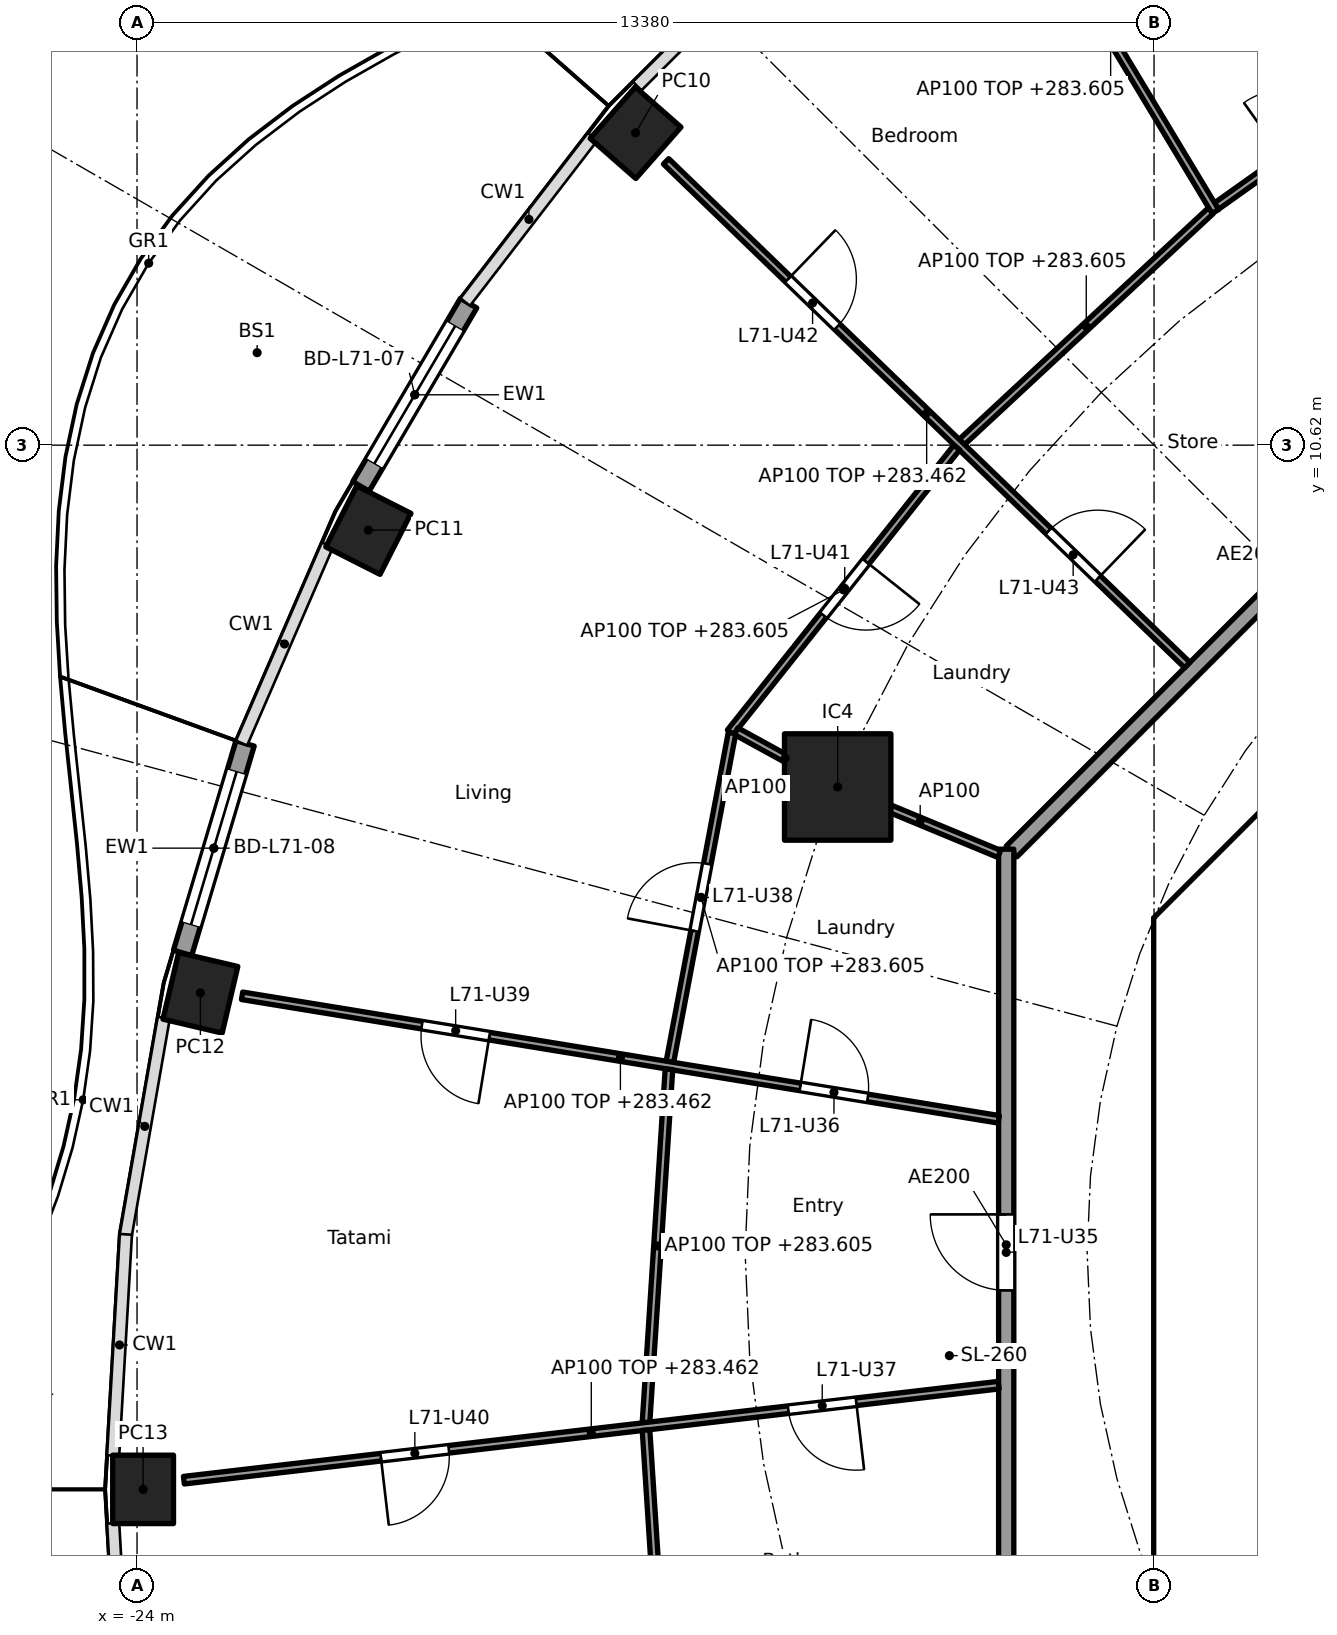
"""IFC4 building model, lengths in metres.
Left out: names, types, materials, properties, quantities, classifications, styles, units other than length and angle.
Written with IfcOpenShell. Run it as: python <this file> out.ifc"""

import sys

from ifc_helpers import new_model, si_unit, direction, frame, frame_2d, origin, origin_2d, place, context, subcontext, project, spatial, polyline, rectangle, hollow_rectangle, outline, extrude, element, fill, save


model = new_model("IFC4")
c1 = context("Model", 3, precision=1e-05, world=origin(), true_north=direction((0.0, 1.0)))
c2 = subcontext(c1, "Body", "Model", "MODEL_VIEW")
j1 = project(units=[si_unit("LENGTHUNIT", "METRE"), si_unit("PLANEANGLEUNIT", "RADIAN")], contexts=[c1])
p1 = place(None, origin())
s1 = spatial("IfcSite", under=j1, at=p1, CompositionType="ELEMENT")
p2 = place(p1, origin())
s2 = spatial("IfcBuilding", under=s1, at=p2, CompositionType="ELEMENT")
p3 = place(p2, frame((0.0, 0.0, 280.7)))
s3 = spatial("IfcBuildingStorey", under=s2, at=p3, CompositionType="ELEMENT", Elevation=280.7)
for number, where, z_axis, x_axis in (
    (1, (-17.441, 14.73, 0.0), (0.0, 0.0, 1.0), (-0.66, -0.751, 0.0)),
    (2, (-20.957, 9.502, 0.0), (0.0, 0.0, 1.0), (-0.452, -0.892, 0.0)),
    (3, (-23.166, 3.415, 0.0), (0.0, 0.0, 1.0), (-0.229, -0.973, 0.0)),
    (4, (-23.92, -3.118, 0.0), (0.0, 0.0, 1.0), (0.0, -1.0, 0.0)),
):
    element("IfcColumn", number, at=place(p3, frame(where, z_axis=z_axis, x_axis=x_axis)), inside=s3, PredefinedType="COLUMN", context=c2, shape_type="SweptSolid", body=[
        extrude(hollow_rectangle(XDim=0.9, YDim=0.8, WallThickness=0.028, at=origin_2d()), origin(), (0.0, 0.0, 1.0), 3.7),
    ])
p4 = place(p3, frame((-14.782, 6.123, 0.0), z_axis=(0.0, 0.0, 1.0), x_axis=(1.0, 0.0, 0.0)))
e5 = element("IfcColumn", 5, at=p4, inside=s3, PredefinedType="COLUMN", context=c2, shape_type="SweptSolid", body=[
    extrude(rectangle(XDim=1.4, YDim=1.4, at=origin_2d()), origin(), (0.0, 0.0, 1.0), 3.7),
])
p5 = place(p3, frame((-21.054, 10.077, 0.0), z_axis=(0.0, 0.0, 1.0), x_axis=(0.506371364425, 0.862315511452, 0.0)))
e6 = element("IfcWall", 6, at=p5, inside=s3, PredefinedType="SOLIDWALL", context=c2, shape_type="SweptSolid", body=[
    extrude(rectangle(XDim=2.796, YDim=0.25, at=frame_2d((1.398, 0.0))), origin(), (0.0, 0.0, 1.0), 3.44),
])
p6 = place(p5, frame((0.348, 0.0, 0.0)))
e7 = element("IfcOpeningElement", 7, at=p6, cuts=e6, PredefinedType="OPENING", context=c2, shape_type="SweptSolid", body=[
    extrude(rectangle(XDim=2.1, YDim=2.4, at=frame_2d((1.05, 1.2))), frame((0.0, 0.135, 0.0), z_axis=(0.0, -1.0, 0.0), x_axis=(1.0, 0.0, 0.0)), (0.0, 0.0, 1.0), 0.27),
])
p7 = place(p3, frame((-23.401, 3.94, 0.0), z_axis=(0.0, 0.0, 1.0), x_axis=(0.285876209024, 0.9582665564, 0.0)))
e8 = element("IfcWall", 8, at=p7, inside=s3, PredefinedType="SOLIDWALL", context=c2, shape_type="SweptSolid", body=[
    extrude(rectangle(XDim=2.877, YDim=0.25, at=frame_2d((1.438, 0.0))), origin(), (0.0, 0.0, 1.0), 3.44),
])
p8 = place(p7, frame((0.389, 0.0, 0.0)))
e9 = element("IfcOpeningElement", 9, at=p8, cuts=e8, PredefinedType="OPENING", context=c2, shape_type="SweptSolid", body=[
    extrude(rectangle(XDim=2.1, YDim=2.4, at=frame_2d((1.05, 1.2))), frame((0.0, 0.135, 0.0), z_axis=(0.0, -1.0, 0.0), x_axis=(1.0, 0.0, 0.0)), (0.0, 0.0, 1.0), 0.27),
])
p9 = place(p3, frame((-4.613, 9.988, 0.0), z_axis=(0.0, 0.0, 1.0), x_axis=(-0.707106781187, -0.707106781187, 0.0)))
e10 = element("IfcWall", 10, at=p9, inside=s3, PredefinedType="SHEAR", context=c2, shape_type="SweptSolid", body=[
    extrude(rectangle(XDim=7.602, YDim=0.6, at=frame_2d((3.801, 0.0))), origin(), (0.0, 0.0, 1.0), 3.44),
])
p10 = place(p9, frame((0.351, 0.0, 0.0)))
e11 = element("IfcOpeningElement", 11, at=p10, cuts=e10, PredefinedType="OPENING", context=c2, shape_type="SweptSolid", body=[
    extrude(rectangle(XDim=1.1, YDim=2.1, at=frame_2d((0.55, 1.05))), frame((0.0, 0.31, 0.0), z_axis=(0.0, -1.0, 0.0), x_axis=(1.0, 0.0, 0.0)), (0.0, 0.0, 1.0), 0.62),
])
p11 = place(p3, frame((-10.325, 3.801, 0.0), z_axis=(0.0, 0.0, 1.0), x_axis=(0.0, -1.0, 0.0)))
e12 = element("IfcWall", 12, at=p11, inside=s3, PredefinedType="SHEAR", context=c2, shape_type="SweptSolid", body=[
    extrude(rectangle(XDim=7.602, YDim=0.6, at=frame_2d((3.801, 0.0))), origin(), (0.0, 0.0, 1.0), 3.44),
])
p12 = place(p11, frame((0.651, 0.0, 0.0)))
e13 = element("IfcOpeningElement", 13, at=p12, cuts=e12, PredefinedType="OPENING", context=c2, shape_type="SweptSolid", body=[
    extrude(rectangle(XDim=1.5, YDim=2.1, at=frame_2d((0.75, 1.05))), frame((0.0, 0.31, 0.0), z_axis=(0.0, -1.0, 0.0), x_axis=(1.0, 0.0, 0.0)), (0.0, 0.0, 1.0), 0.62),
])
p13 = place(p11, frame((5.451, 0.0, 0.0)))
e14 = element("IfcOpeningElement", 14, at=p13, cuts=e12, PredefinedType="OPENING", context=c2, shape_type="SweptSolid", body=[
    extrude(rectangle(XDim=1.5, YDim=2.1, at=frame_2d((0.75, 1.05))), frame((0.0, 0.31, 0.0), z_axis=(0.0, -1.0, 0.0), x_axis=(1.0, 0.0, 0.0)), (0.0, 0.0, 1.0), 0.62),
])
p14 = place(p3, origin())
e15 = element("IfcWall", 15, at=p14, inside=s3, PredefinedType="SHEAR", context=c2, shape_type="SweptSolid", body=[
    extrude(outline(polyline([(-10.625, -3.801), (-10.025, -3.801), (-10.025, -4.152), (-9.776, -4.401), (-10.2, -4.825), (-10.625, -4.401), (-10.625, -3.801)])), origin(), (0.0, 0.0, 1.0), 3.44),
])
p15 = place(p3, origin())
e16 = element("IfcWall", 16, at=p15, inside=s3, PredefinedType="SHEAR", context=c2, shape_type="SweptSolid", body=[
    extrude(outline(polyline([(-10.2, 4.825), (-9.776, 4.401), (-10.025, 4.152), (-10.025, 3.801), (-10.625, 3.801), (-10.625, 4.401), (-10.2, 4.825)])), origin(), (0.0, 0.0, 1.0), 3.44),
])
for number, where, z_axis, x_axis in (
    (17, (-10.025, -4.0, 0.0), (0.0, 0.0, 1.0), (1.0, 0.0, 0.0)),
    (18, (-10.025, 4.0, 0.0), (0.0, 0.0, 1.0), (1.0, 0.0, 0.0)),
):
    element("IfcWall", number, at=place(p3, frame(where, z_axis=z_axis, x_axis=x_axis)), inside=s3, PredefinedType="PARTITIONING", context=c2, shape_type="SweptSolid", body=[
        extrude(rectangle(XDim=3.325, YDim=0.2, at=frame_2d((1.662, 0.0))), origin(), (0.0, 0.0, 1.0), 3.44),
    ])
p16 = place(p3, frame((-5.275, 12.494, 0.0), z_axis=(0.0, 0.0, 1.0), x_axis=(-0.707106781187, -0.707106781187, 0.0)))
e19 = element("IfcWall", 19, at=p16, inside=s3, PredefinedType="PARTITIONING", context=c2, shape_type="SweptSolid", body=[
    extrude(rectangle(XDim=10.209, YDim=0.2, at=frame_2d((5.104, 0.0))), origin(), (0.0, 0.0, 1.0), 3.44),
])
p17 = place(p3, frame((-12.565, 5.304, 0.0), z_axis=(0.0, 0.0, 1.0), x_axis=(0.0, -1.0, 0.0)))
e20 = element("IfcWall", 20, at=p17, inside=s3, PredefinedType="PARTITIONING", context=c2, shape_type="SweptSolid", body=[
    extrude(rectangle(XDim=10.409, YDim=0.2, at=frame_2d((5.205, 0.0))), origin(), (0.0, 0.0, 1.0), 3.44),
])
p18 = place(p17, frame((4.804, 0.0, 0.0)))
e21 = element("IfcOpeningElement", 21, at=p18, cuts=e20, PredefinedType="OPENING", context=c2, shape_type="SweptSolid", body=[
    extrude(rectangle(XDim=1.0, YDim=2.1, at=frame_2d((0.5, 1.05))), frame((0.0, 0.11, 0.0), z_axis=(0.0, -1.0, 0.0), x_axis=(1.0, 0.0, 0.0)), (0.0, 0.0, 1.0), 0.22),
])
p19 = place(p3, frame((-6.508, 16.103, 0.0), z_axis=(0.0, 0.0, 1.0), x_axis=(-0.815202203556, -0.579176456114, 0.0)))
e22 = element("IfcWall", 22, at=p19, inside=s3, PredefinedType="PARTITIONING", context=c2, shape_type="SweptSolid", body=[
    extrude(rectangle(XDim=4.036, YDim=0.1, at=frame_2d((2.018, 0.0))), origin(), (0.0, 0.0, 1.0), 2.905),
])
p20 = place(p19, frame((2.055, 0.0, 0.0)))
e23 = element("IfcOpeningElement", 23, at=p20, cuts=e22, PredefinedType="OPENING", context=c2, shape_type="SweptSolid", body=[
    extrude(rectangle(XDim=0.9, YDim=2.1, at=frame_2d((0.45, 1.05))), frame((0.0, 0.06, 0.0), z_axis=(0.0, -1.0, 0.0), x_axis=(1.0, 0.0, 0.0)), (0.0, 0.0, 1.0), 0.12),
])
p21 = place(p3, frame((-9.813, 13.693, 0.0), z_axis=(0.0, 0.0, 1.0), x_axis=(-0.515509511815, 0.856883856324, 0.0)))
e24 = element("IfcWall", 24, at=p21, inside=s3, PredefinedType="PARTITIONING", context=c2, shape_type="SweptSolid", body=[
    extrude(rectangle(XDim=5.346, YDim=0.1, at=frame_2d((2.673, 0.0))), origin(), (0.0, 0.0, 1.0), 2.905),
])
p22 = place(p3, frame((-9.875, 13.702, 0.0), z_axis=(0.0, 0.0, 1.0), x_axis=(-0.732618266441, -0.680639754699, 0.0)))
e25 = element("IfcWall", 25, at=p22, inside=s3, PredefinedType="PARTITIONING", context=c2, shape_type="SweptSolid", body=[
    extrude(rectangle(XDim=4.467, YDim=0.1, at=frame_2d((2.233, 0.0))), origin(), (0.0, 0.0, 1.0), 2.905),
])
p23 = place(p3, frame((-10.183, 7.727, 0.0), z_axis=(0.0, 0.0, 1.0), x_axis=(-0.719063433856, 0.694944442449, 0.0)))
e26 = element("IfcWall", 26, at=p23, inside=s3, PredefinedType="PARTITIONING", context=c2, shape_type="SweptSolid", body=[
    extrude(rectangle(XDim=9.535, YDim=0.1, at=frame_2d((4.768, 0.0))), origin(), (0.0, 0.0, 1.0), 2.762),
])
p24 = place(p23, frame((6.405, 0.0, 0.0)))
e27 = element("IfcOpeningElement", 27, at=p24, cuts=e26, PredefinedType="OPENING", context=c2, shape_type="SweptSolid", body=[
    extrude(rectangle(XDim=0.9, YDim=2.1, at=frame_2d((0.45, 1.05))), frame((0.0, 0.06, 0.0), z_axis=(0.0, -1.0, 0.0), x_axis=(1.0, 0.0, 0.0)), (0.0, 0.0, 1.0), 0.12),
])
p25 = place(p23, frame((1.637, 0.0, 0.0)))
e28 = element("IfcOpeningElement", 28, at=p25, cuts=e26, PredefinedType="OPENING", context=c2, shape_type="SweptSolid", body=[
    extrude(rectangle(XDim=0.9, YDim=2.1, at=frame_2d((0.45, 1.05))), frame((0.0, 0.06, 0.0), z_axis=(0.0, -1.0, 0.0), x_axis=(1.0, 0.0, 0.0)), (0.0, 0.0, 1.0), 0.12),
])
p26 = place(p3, frame((-13.216, 10.589, 0.0), z_axis=(0.0, 0.0, 1.0), x_axis=(-0.622272178674, -0.782800955319, 0.0)))
e29 = element("IfcWall", 29, at=p26, inside=s3, PredefinedType="PARTITIONING", context=c2, shape_type="SweptSolid", body=[
    extrude(rectangle(XDim=4.786, YDim=0.1, at=frame_2d((2.393, 0.0))), origin(), (0.0, 0.0, 1.0), 2.905),
])
p27 = place(p26, frame((1.918, 0.0, 0.0)))
e30 = element("IfcOpeningElement", 30, at=p27, cuts=e29, PredefinedType="OPENING", context=c2, shape_type="SweptSolid", body=[
    extrude(rectangle(XDim=0.9, YDim=2.1, at=frame_2d((0.45, 1.05))), frame((0.0, 0.06, 0.0), z_axis=(0.0, -1.0, 0.0), x_axis=(1.0, 0.0, 0.0)), (0.0, 0.0, 1.0), 0.12),
])
p28 = place(p3, frame((-12.657, 5.243, 0.0), z_axis=(0.0, 0.0, 1.0), x_axis=(-0.923864733477, 0.382719158442, 0.0)))
e31 = element("IfcWall", 31, at=p28, inside=s3, PredefinedType="PARTITIONING", context=c2, shape_type="SweptSolid", body=[
    extrude(rectangle(XDim=2.25, YDim=0.1, at=frame_2d((1.125, 0.0))), origin(), (0.0, 0.0, 1.0), 3.44),
])
p29 = place(p3, frame((-14.826, 6.147, 0.0), z_axis=(0.0, 0.0, 1.0), x_axis=(-0.876411496923, 0.481562963755, 0.0)))
e32 = element("IfcWall", 32, at=p29, inside=s3, PredefinedType="PARTITIONING", context=c2, shape_type="SweptSolid", body=[
    extrude(rectangle(XDim=1.475, YDim=0.1, at=frame_2d((0.738, 0.0))), origin(), (0.0, 0.0, 1.0), 3.44),
])
p30 = place(p3, frame((-16.172, 6.832, 0.0), z_axis=(0.0, 0.0, 1.0), x_axis=(-0.185671645069, -0.982611846162, 0.0)))
e33 = element("IfcWall", 33, at=p30, inside=s3, PredefinedType="PARTITIONING", context=c2, shape_type="SweptSolid", body=[
    extrude(rectangle(XDim=4.401, YDim=0.1, at=frame_2d((2.2, 0.0))), origin(), (0.0, 0.0, 1.0), 2.905),
])
p31 = place(p30, frame((1.75, 0.0, 0.0)))
e34 = element("IfcOpeningElement", 34, at=p31, cuts=e33, PredefinedType="OPENING", context=c2, shape_type="SweptSolid", body=[
    extrude(rectangle(XDim=0.9, YDim=2.1, at=frame_2d((0.45, 1.05))), frame((0.0, 0.06, 0.0), z_axis=(0.0, -1.0, 0.0), x_axis=(1.0, 0.0, 0.0)), (0.0, 0.0, 1.0), 0.12),
])
p32 = place(p3, frame((-12.664, 1.751, 0.0), z_axis=(0.0, 0.0, 1.0), x_axis=(-0.986935394566, 0.161116501183, 0.0)))
e35 = element("IfcWall", 35, at=p32, inside=s3, PredefinedType="PARTITIONING", context=c2, shape_type="SweptSolid", body=[
    extrude(rectangle(XDim=10.086, YDim=0.1, at=frame_2d((5.043, 0.0))), origin(), (0.0, 0.0, 1.0), 2.762),
])
p33 = place(p32, frame((1.746, 0.0, 0.0)))
e36 = element("IfcOpeningElement", 36, at=p33, cuts=e35, PredefinedType="OPENING", context=c2, shape_type="SweptSolid", body=[
    extrude(rectangle(XDim=0.9, YDim=2.1, at=frame_2d((0.45, 1.05))), frame((0.0, 0.06, 0.0), z_axis=(0.0, -1.0, 0.0), x_axis=(1.0, 0.0, 0.0)), (0.0, 0.0, 1.0), 0.12),
])
p34 = place(p32, frame((6.789, 0.0, 0.0)))
e37 = element("IfcOpeningElement", 37, at=p34, cuts=e35, PredefinedType="OPENING", context=c2, shape_type="SweptSolid", body=[
    extrude(rectangle(XDim=0.9, YDim=2.1, at=frame_2d((0.45, 1.05))), frame((0.0, 0.06, 0.0), z_axis=(0.0, -1.0, 0.0), x_axis=(1.0, 0.0, 0.0)), (0.0, 0.0, 1.0), 0.12),
])
p35 = place(p3, frame((-17.002, 2.409, 0.0), z_axis=(0.0, 0.0, 1.0), x_axis=(-0.064855550758, -0.997894662545, 0.0)))
e38 = element("IfcWall", 38, at=p35, inside=s3, PredefinedType="PARTITIONING", context=c2, shape_type="SweptSolid", body=[
    extrude(rectangle(XDim=4.656, YDim=0.1, at=frame_2d((2.328, 0.0))), origin(), (0.0, 0.0, 1.0), 2.905),
])
p36 = place(p3, frame((-12.664, -1.746, 0.0), z_axis=(0.0, 0.0, 1.0), x_axis=(-0.993264397529, -0.115869912409, 0.0)))
e39 = element("IfcWall", 39, at=p36, inside=s3, PredefinedType="PARTITIONING", context=c2, shape_type="SweptSolid", body=[
    extrude(rectangle(XDim=10.792, YDim=0.1, at=frame_2d((5.396, 0.0))), origin(), (0.0, 0.0, 1.0), 2.762),
])
p37 = place(p36, frame((1.887, 0.0, 0.0)))
e40 = element("IfcOpeningElement", 40, at=p37, cuts=e39, PredefinedType="OPENING", context=c2, shape_type="SweptSolid", body=[
    extrude(rectangle(XDim=0.9, YDim=2.1, at=frame_2d((0.45, 1.05))), frame((0.0, 0.06, 0.0), z_axis=(0.0, -1.0, 0.0), x_axis=(1.0, 0.0, 0.0)), (0.0, 0.0, 1.0), 0.12),
])
p38 = place(p36, frame((7.283, 0.0, 0.0)))
e41 = element("IfcOpeningElement", 41, at=p38, cuts=e39, PredefinedType="OPENING", context=c2, shape_type="SweptSolid", body=[
    extrude(rectangle(XDim=0.9, YDim=2.1, at=frame_2d((0.45, 1.05))), frame((0.0, 0.06, 0.0), z_axis=(0.0, -1.0, 0.0), x_axis=(1.0, 0.0, 0.0)), (0.0, 0.0, 1.0), 0.12),
])
p39 = place(p3, frame((-17.304, -2.338, 0.0), z_axis=(0.0, 0.0, 1.0), x_axis=(0.06500001157, -0.997885263192, 0.0)))
e42 = element("IfcWall", 42, at=p39, inside=s3, PredefinedType="PARTITIONING", context=c2, shape_type="SweptSolid", body=[
    extrude(rectangle(XDim=4.609, YDim=0.1, at=frame_2d((2.304, 0.0))), origin(), (0.0, 0.0, 1.0), 2.905),
])
p40 = place(p6, origin())
e43 = element("IfcDoor", 43, at=p40, inside=s3, OperationType="SLIDING_TO_LEFT", PredefinedType="DOOR", context=c2, shape_type="SweptSolid", body=[
    extrude(rectangle(XDim=2.1, YDim=2.4, at=frame_2d((1.05, 1.2))), frame((0.0, 0.025, 0.0), z_axis=(0.0, -1.0, 0.0), x_axis=(1.0, 0.0, 0.0)), (0.0, 0.0, 1.0), 0.05),
])
fill(e7, e43)
p41 = place(p8, origin())
e44 = element("IfcDoor", 44, at=p41, inside=s3, OperationType="SLIDING_TO_LEFT", PredefinedType="DOOR", context=c2, shape_type="SweptSolid", body=[
    extrude(rectangle(XDim=2.1, YDim=2.4, at=frame_2d((1.05, 1.2))), frame((0.0, 0.025, 0.0), z_axis=(0.0, -1.0, 0.0), x_axis=(1.0, 0.0, 0.0)), (0.0, 0.0, 1.0), 0.05),
])
fill(e9, e44)
p42 = place(p12, origin())
e45 = element("IfcDoor", 45, at=p42, inside=s3, OperationType="DOUBLE_DOOR_SINGLE_SWING", PredefinedType="DOOR", context=c2, shape_type="SweptSolid", body=[
    extrude(rectangle(XDim=1.5, YDim=2.1, at=frame_2d((0.75, 1.05))), frame((0.0, 0.025, 0.0), z_axis=(0.0, -1.0, 0.0), x_axis=(1.0, 0.0, 0.0)), (0.0, 0.0, 1.0), 0.05),
])
fill(e13, e45)
p43 = place(p13, origin())
e46 = element("IfcDoor", 46, at=p43, inside=s3, OperationType="DOUBLE_DOOR_SINGLE_SWING", PredefinedType="DOOR", context=c2, shape_type="SweptSolid", body=[
    extrude(rectangle(XDim=1.5, YDim=2.1, at=frame_2d((0.75, 1.05))), frame((0.0, 0.025, 0.0), z_axis=(0.0, -1.0, 0.0), x_axis=(1.0, 0.0, 0.0)), (0.0, 0.0, 1.0), 0.05),
])
fill(e14, e46)
p44 = place(p18, frame((1.0, 0.0, 0.0), x_axis=(-1.0, 0.0, 0.0)))
e47 = element("IfcDoor", 47, at=p44, inside=s3, OperationType="SINGLE_SWING_RIGHT", PredefinedType="DOOR", context=c2, shape_type="SweptSolid", body=[
    extrude(rectangle(XDim=1.0, YDim=2.1, at=frame_2d((0.5, 1.05))), frame((0.0, 0.025, 0.0), z_axis=(0.0, -1.0, 0.0), x_axis=(1.0, 0.0, 0.0)), (0.0, 0.0, 1.0), 0.05),
])
fill(e21, e47)
p45 = place(p33, frame((0.9, 0.0, 0.0), x_axis=(-1.0, 0.0, 0.0)))
e48 = element("IfcDoor", 48, at=p45, inside=s3, OperationType="SINGLE_SWING_LEFT", PredefinedType="DOOR", context=c2, shape_type="SweptSolid", body=[
    extrude(rectangle(XDim=0.9, YDim=2.1, at=frame_2d((0.45, 1.05))), frame((0.0, 0.025, 0.0), z_axis=(0.0, -1.0, 0.0), x_axis=(1.0, 0.0, 0.0)), (0.0, 0.0, 1.0), 0.05),
])
fill(e36, e48)
p46 = place(p37, origin())
e49 = element("IfcDoor", 49, at=p46, inside=s3, OperationType="SINGLE_SWING_LEFT", PredefinedType="DOOR", context=c2, shape_type="SweptSolid", body=[
    extrude(rectangle(XDim=0.9, YDim=2.1, at=frame_2d((0.45, 1.05))), frame((0.0, 0.025, 0.0), z_axis=(0.0, -1.0, 0.0), x_axis=(1.0, 0.0, 0.0)), (0.0, 0.0, 1.0), 0.05),
])
fill(e40, e49)
p47 = place(p31, frame((0.9, 0.0, 0.0), x_axis=(-1.0, 0.0, 0.0)))
e50 = element("IfcDoor", 50, at=p47, inside=s3, OperationType="SINGLE_SWING_LEFT", PredefinedType="DOOR", context=c2, shape_type="SweptSolid", body=[
    extrude(rectangle(XDim=0.9, YDim=2.1, at=frame_2d((0.45, 1.05))), frame((0.0, 0.025, 0.0), z_axis=(0.0, -1.0, 0.0), x_axis=(1.0, 0.0, 0.0)), (0.0, 0.0, 1.0), 0.05),
])
fill(e34, e50)
p48 = place(p34, origin())
e51 = element("IfcDoor", 51, at=p48, inside=s3, OperationType="SINGLE_SWING_LEFT", PredefinedType="DOOR", context=c2, shape_type="SweptSolid", body=[
    extrude(rectangle(XDim=0.9, YDim=2.1, at=frame_2d((0.45, 1.05))), frame((0.0, 0.025, 0.0), z_axis=(0.0, -1.0, 0.0), x_axis=(1.0, 0.0, 0.0)), (0.0, 0.0, 1.0), 0.05),
])
fill(e37, e51)
p49 = place(p38, origin())
e52 = element("IfcDoor", 52, at=p49, inside=s3, OperationType="SINGLE_SWING_RIGHT", PredefinedType="DOOR", context=c2, shape_type="SweptSolid", body=[
    extrude(rectangle(XDim=0.9, YDim=2.1, at=frame_2d((0.45, 1.05))), frame((0.0, 0.025, 0.0), z_axis=(0.0, -1.0, 0.0), x_axis=(1.0, 0.0, 0.0)), (0.0, 0.0, 1.0), 0.05),
])
fill(e41, e52)
p50 = place(p27, origin())
e53 = element("IfcDoor", 53, at=p50, inside=s3, OperationType="SINGLE_SWING_LEFT", PredefinedType="DOOR", context=c2, shape_type="SweptSolid", body=[
    extrude(rectangle(XDim=0.9, YDim=2.1, at=frame_2d((0.45, 1.05))), frame((0.0, 0.025, 0.0), z_axis=(0.0, -1.0, 0.0), x_axis=(1.0, 0.0, 0.0)), (0.0, 0.0, 1.0), 0.05),
])
fill(e30, e53)
p51 = place(p24, frame((0.9, 0.0, 0.0), x_axis=(-1.0, 0.0, 0.0)))
e54 = element("IfcDoor", 54, at=p51, inside=s3, OperationType="SINGLE_SWING_LEFT", PredefinedType="DOOR", context=c2, shape_type="SweptSolid", body=[
    extrude(rectangle(XDim=0.9, YDim=2.1, at=frame_2d((0.45, 1.05))), frame((0.0, 0.025, 0.0), z_axis=(0.0, -1.0, 0.0), x_axis=(1.0, 0.0, 0.0)), (0.0, 0.0, 1.0), 0.05),
])
fill(e27, e54)
p52 = place(p25, frame((0.9, 0.0, 0.0), x_axis=(-1.0, 0.0, 0.0)))
e55 = element("IfcDoor", 55, at=p52, inside=s3, OperationType="SINGLE_SWING_RIGHT", PredefinedType="DOOR", context=c2, shape_type="SweptSolid", body=[
    extrude(rectangle(XDim=0.9, YDim=2.1, at=frame_2d((0.45, 1.05))), frame((0.0, 0.025, 0.0), z_axis=(0.0, -1.0, 0.0), x_axis=(1.0, 0.0, 0.0)), (0.0, 0.0, 1.0), 0.05),
])
fill(e28, e55)
save(model, sys.argv[1])
